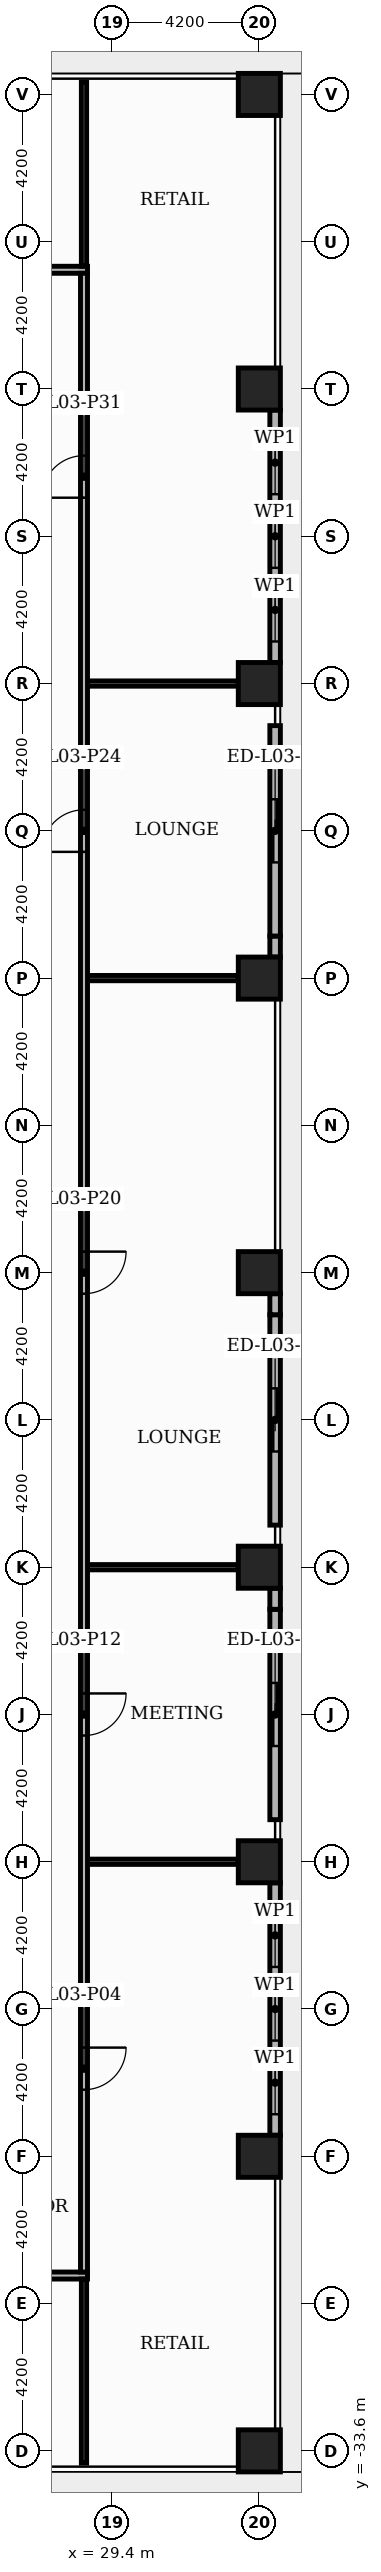
"""IFC4 building model, lengths in metres.
Left out: names, types, materials, properties, quantities, classifications, styles, units other than length and angle.
Written with IfcOpenShell. Run it as: python <this file> out.ifc"""

import sys

from ifc_helpers import new_model, si_unit, direction, frame, frame_2d, origin, origin_2d, place, context, subcontext, project, spatial, rectangle, extrude, element, fill, save


model = new_model("IFC4")
c1 = context("Model", 3, precision=1e-05, world=origin(), true_north=direction((0.0, 1.0)))
c2 = subcontext(c1, "Body", "Model", "MODEL_VIEW")
j1 = project(units=[si_unit("LENGTHUNIT", "METRE"), si_unit("PLANEANGLEUNIT", "RADIAN")], contexts=[c1])
p1 = place(None, origin())
s1 = spatial("IfcSite", under=j1, at=p1, CompositionType="ELEMENT")
p2 = place(p1, origin())
s2 = spatial("IfcBuilding", under=s1, at=p2, CompositionType="ELEMENT")
p3 = place(p2, frame((0.0, 0.0, 16.8)))
s3 = spatial("IfcBuildingStorey", under=s2, at=p3, CompositionType="ELEMENT", Elevation=16.8)
for number, where, z_axis, x_axis in (
    (1, (33.6, 0.0, 0.0), (0.0, 0.0, 1.0), (1.0, 0.0, 0.0)),
    (2, (33.6, 8.4, 0.0), (0.0, 0.0, 1.0), (1.0, 0.0, 0.0)),
    (3, (33.6, 16.8, 0.0), (0.0, 0.0, 1.0), (1.0, 0.0, 0.0)),
    (4, (33.6, 25.2, 0.0), (0.0, 0.0, 1.0), (1.0, 0.0, 0.0)),
    (5, (33.6, 33.6, 0.0), (0.0, 0.0, 1.0), (1.0, 0.0, 0.0)),
    (6, (33.6, -8.4, 0.0), (0.0, 0.0, 1.0), (1.0, 0.0, 0.0)),
    (7, (33.6, -16.8, 0.0), (0.0, 0.0, 1.0), (1.0, 0.0, 0.0)),
    (8, (33.6, -25.2, 0.0), (0.0, 0.0, 1.0), (1.0, 0.0, 0.0)),
    (9, (33.6, -33.6, 0.0), (0.0, 0.0, 1.0), (1.0, 0.0, 0.0)),
):
    element("IfcColumn", number, at=place(p3, frame(where, z_axis=z_axis, x_axis=x_axis)), inside=s3, PredefinedType="COLUMN", context=c2, shape_type="SweptSolid", body=[
        extrude(rectangle(XDim=1.2, YDim=1.2, at=origin_2d()), origin(), (0.0, 0.0, 1.0), 5.4),
    ])
p4 = place(p3, frame((34.05, -24.6, 0.0), z_axis=(0.0, 0.0, 1.0), x_axis=(0.0, 1.0, 0.0)))
e10 = element("IfcWall", 10, at=p4, inside=s3, PredefinedType="STANDARD", context=c2, shape_type="SweptSolid", body=[
    extrude(rectangle(XDim=7.2, YDim=0.3, at=frame_2d((3.6, 0.0))), origin(), (0.0, 0.0, 1.0), 4.98),
])
p5 = place(p4, frame((0.6, 0.0, 0.6)))
e11 = element("IfcOpeningElement", 11, at=p5, cuts=e10, PredefinedType="OPENING", context=c2, shape_type="SweptSolid", body=[
    extrude(rectangle(XDim=1.8, YDim=3.0, at=frame_2d((0.9, 1.5))), frame((0.0, 0.16, 0.0), z_axis=(0.0, -1.0, 0.0), x_axis=(1.0, 0.0, 0.0)), (0.0, 0.0, 1.0), 0.32),
])
p6 = place(p4, frame((2.7, 0.0, 0.6)))
e12 = element("IfcOpeningElement", 12, at=p6, cuts=e10, PredefinedType="OPENING", context=c2, shape_type="SweptSolid", body=[
    extrude(rectangle(XDim=1.8, YDim=3.0, at=frame_2d((0.9, 1.5))), frame((0.0, 0.16, 0.0), z_axis=(0.0, -1.0, 0.0), x_axis=(1.0, 0.0, 0.0)), (0.0, 0.0, 1.0), 0.32),
])
p7 = place(p4, frame((4.8, 0.0, 0.6)))
e13 = element("IfcOpeningElement", 13, at=p7, cuts=e10, PredefinedType="OPENING", context=c2, shape_type="SweptSolid", body=[
    extrude(rectangle(XDim=1.8, YDim=3.0, at=frame_2d((0.9, 1.5))), frame((0.0, 0.16, 0.0), z_axis=(0.0, -1.0, 0.0), x_axis=(1.0, 0.0, 0.0)), (0.0, 0.0, 1.0), 0.32),
])
p8 = place(p3, frame((34.05, -15.6, 0.0), z_axis=(0.0, 0.0, 1.0), x_axis=(0.0, 1.0, 0.0)))
e14 = element("IfcWall", 14, at=p8, inside=s3, PredefinedType="STANDARD", context=c2, shape_type="SweptSolid", body=[
    extrude(rectangle(XDim=6.0, YDim=0.3, at=frame_2d((3.0, 0.0))), origin(), (0.0, 0.0, 1.0), 4.98),
])
p9 = place(p8, frame((2.1, 0.0, 0.0)))
e15 = element("IfcOpeningElement", 15, at=p9, cuts=e14, PredefinedType="OPENING", context=c2, shape_type="SweptSolid", body=[
    extrude(rectangle(XDim=1.8, YDim=2.4, at=frame_2d((0.9, 1.2))), frame((0.0, 0.16, 0.0), z_axis=(0.0, -1.0, 0.0), x_axis=(1.0, 0.0, 0.0)), (0.0, 0.0, 1.0), 0.32),
])
p10 = place(p3, frame((34.05, -9.6, 0.0), z_axis=(0.0, 0.0, 1.0), x_axis=(0.0, 1.0, 0.0)))
e16 = element("IfcWall", 16, at=p10, inside=s3, PredefinedType="STANDARD", context=c2, shape_type="SweptSolid", body=[
    extrude(rectangle(XDim=0.6, YDim=0.3, at=frame_2d((0.3, 0.0))), origin(), (0.0, 0.0, 1.0), 4.98),
])
p11 = place(p3, frame((34.05, -7.2, 0.0), z_axis=(0.0, 0.0, 1.0), x_axis=(0.0, 1.0, 0.0)))
e17 = element("IfcWall", 17, at=p11, inside=s3, PredefinedType="STANDARD", context=c2, shape_type="SweptSolid", body=[
    extrude(rectangle(XDim=6.0, YDim=0.3, at=frame_2d((3.0, 0.0))), origin(), (0.0, 0.0, 1.0), 4.98),
])
p12 = place(p11, frame((2.1, 0.0, 0.0)))
e18 = element("IfcOpeningElement", 18, at=p12, cuts=e17, PredefinedType="OPENING", context=c2, shape_type="SweptSolid", body=[
    extrude(rectangle(XDim=1.8, YDim=2.4, at=frame_2d((0.9, 1.2))), frame((0.0, 0.16, 0.0), z_axis=(0.0, -1.0, 0.0), x_axis=(1.0, 0.0, 0.0)), (0.0, 0.0, 1.0), 0.32),
])
p13 = place(p3, frame((34.05, -1.2, 0.0), z_axis=(0.0, 0.0, 1.0), x_axis=(0.0, 1.0, 0.0)))
e19 = element("IfcWall", 19, at=p13, inside=s3, PredefinedType="STANDARD", context=c2, shape_type="SweptSolid", body=[
    extrude(rectangle(XDim=0.6, YDim=0.3, at=frame_2d((0.3, 0.0))), origin(), (0.0, 0.0, 1.0), 4.98),
])
p14 = place(p3, frame((34.05, 9.0, 0.0), z_axis=(0.0, 0.0, 1.0), x_axis=(0.0, 1.0, 0.0)))
e20 = element("IfcWall", 20, at=p14, inside=s3, PredefinedType="STANDARD", context=c2, shape_type="SweptSolid", body=[
    extrude(rectangle(XDim=0.6, YDim=0.3, at=frame_2d((0.3, 0.0))), origin(), (0.0, 0.0, 1.0), 4.98),
])
p15 = place(p3, frame((34.05, 9.6, 0.0), z_axis=(0.0, 0.0, 1.0), x_axis=(0.0, 1.0, 0.0)))
e21 = element("IfcWall", 21, at=p15, inside=s3, PredefinedType="STANDARD", context=c2, shape_type="SweptSolid", body=[
    extrude(rectangle(XDim=6.0, YDim=0.3, at=frame_2d((3.0, 0.0))), origin(), (0.0, 0.0, 1.0), 4.98),
])
p16 = place(p15, frame((2.1, 0.0, 0.0)))
e22 = element("IfcOpeningElement", 22, at=p16, cuts=e21, PredefinedType="OPENING", context=c2, shape_type="SweptSolid", body=[
    extrude(rectangle(XDim=1.8, YDim=2.4, at=frame_2d((0.9, 1.2))), frame((0.0, 0.16, 0.0), z_axis=(0.0, -1.0, 0.0), x_axis=(1.0, 0.0, 0.0)), (0.0, 0.0, 1.0), 0.32),
])
p17 = place(p3, frame((34.05, 17.4, 0.0), z_axis=(0.0, 0.0, 1.0), x_axis=(0.0, 1.0, 0.0)))
e23 = element("IfcWall", 23, at=p17, inside=s3, PredefinedType="STANDARD", context=c2, shape_type="SweptSolid", body=[
    extrude(rectangle(XDim=7.2, YDim=0.3, at=frame_2d((3.6, 0.0))), origin(), (0.0, 0.0, 1.0), 4.98),
])
p18 = place(p17, frame((0.6, 0.0, 0.6)))
e24 = element("IfcOpeningElement", 24, at=p18, cuts=e23, PredefinedType="OPENING", context=c2, shape_type="SweptSolid", body=[
    extrude(rectangle(XDim=1.8, YDim=3.0, at=frame_2d((0.9, 1.5))), frame((0.0, 0.16, 0.0), z_axis=(0.0, -1.0, 0.0), x_axis=(1.0, 0.0, 0.0)), (0.0, 0.0, 1.0), 0.32),
])
p19 = place(p17, frame((2.7, 0.0, 0.6)))
e25 = element("IfcOpeningElement", 25, at=p19, cuts=e23, PredefinedType="OPENING", context=c2, shape_type="SweptSolid", body=[
    extrude(rectangle(XDim=1.8, YDim=3.0, at=frame_2d((0.9, 1.5))), frame((0.0, 0.16, 0.0), z_axis=(0.0, -1.0, 0.0), x_axis=(1.0, 0.0, 0.0)), (0.0, 0.0, 1.0), 0.32),
])
p20 = place(p17, frame((4.8, 0.0, 0.6)))
e26 = element("IfcOpeningElement", 26, at=p20, cuts=e23, PredefinedType="OPENING", context=c2, shape_type="SweptSolid", body=[
    extrude(rectangle(XDim=1.8, YDim=3.0, at=frame_2d((0.9, 1.5))), frame((0.0, 0.16, 0.0), z_axis=(0.0, -1.0, 0.0), x_axis=(1.0, 0.0, 0.0)), (0.0, 0.0, 1.0), 0.32),
])
p21 = place(p3, frame((-28.7, -28.6, 0.0), z_axis=(0.0, 0.0, 1.0), x_axis=(1.0, 0.0, 0.0)))
e27 = element("IfcWall", 27, at=p21, inside=s3, PredefinedType="PARTITIONING", context=c2, shape_type="SweptSolid", body=[
    extrude(rectangle(XDim=57.4, YDim=0.2, at=frame_2d((28.7, 0.0))), origin(), (0.0, 0.0, 1.0), 4.68),
])
p22 = place(p21, frame((7.5, 0.0, 0.0)))
e28 = element("IfcOpeningElement", 28, at=p22, cuts=e27, PredefinedType="OPENING", context=c2, shape_type="SweptSolid", body=[
    extrude(rectangle(XDim=1.2, YDim=2.2, at=frame_2d((0.6, 1.1))), frame((0.0, 0.11, 0.0), z_axis=(0.0, -1.0, 0.0), x_axis=(1.0, 0.0, 0.0)), (0.0, 0.0, 1.0), 0.22),
])
p23 = place(p21, frame((28.1, 0.0, 0.0)))
e29 = element("IfcOpeningElement", 29, at=p23, cuts=e27, PredefinedType="OPENING", context=c2, shape_type="SweptSolid", body=[
    extrude(rectangle(XDim=1.2, YDim=2.2, at=frame_2d((0.6, 1.1))), frame((0.0, 0.11, 0.0), z_axis=(0.0, -1.0, 0.0), x_axis=(1.0, 0.0, 0.0)), (0.0, 0.0, 1.0), 0.22),
])
p24 = place(p21, frame((48.7, 0.0, 0.0)))
e30 = element("IfcOpeningElement", 30, at=p24, cuts=e27, PredefinedType="OPENING", context=c2, shape_type="SweptSolid", body=[
    extrude(rectangle(XDim=1.2, YDim=2.2, at=frame_2d((0.6, 1.1))), frame((0.0, 0.11, 0.0), z_axis=(0.0, -1.0, 0.0), x_axis=(1.0, 0.0, 0.0)), (0.0, 0.0, 1.0), 0.22),
])
for number, where, z_axis, x_axis in (
    (31, (28.7, -16.8, 0.0), (0.0, 0.0, 1.0), (1.0, 0.0, 0.0)),
    (32, (28.7, -8.4, 0.0), (0.0, 0.0, 1.0), (1.0, 0.0, 0.0)),
    (33, (28.7, 8.4, 0.0), (0.0, 0.0, 1.0), (1.0, 0.0, 0.0)),
    (34, (28.7, 16.8, 0.0), (0.0, 0.0, 1.0), (1.0, 0.0, 0.0)),
):
    element("IfcWall", number, at=place(p3, frame(where, z_axis=z_axis, x_axis=x_axis)), inside=s3, PredefinedType="PARTITIONING", context=c2, shape_type="SweptSolid", body=[
        extrude(rectangle(XDim=4.3, YDim=0.15, at=frame_2d((2.15, 0.0))), origin(), (0.0, 0.0, 1.0), 4.78),
    ])
p25 = place(p3, frame((-28.7, 28.6, 0.0), z_axis=(0.0, 0.0, 1.0), x_axis=(1.0, 0.0, 0.0)))
e35 = element("IfcWall", 35, at=p25, inside=s3, PredefinedType="PARTITIONING", context=c2, shape_type="SweptSolid", body=[
    extrude(rectangle(XDim=57.4, YDim=0.2, at=frame_2d((28.7, 0.0))), origin(), (0.0, 0.0, 1.0), 4.68),
])
p26 = place(p25, frame((13.8, 0.0, 0.0)))
e36 = element("IfcOpeningElement", 36, at=p26, cuts=e35, PredefinedType="OPENING", context=c2, shape_type="SweptSolid", body=[
    extrude(rectangle(XDim=1.2, YDim=2.2, at=frame_2d((0.6, 1.1))), frame((0.0, 0.11, 0.0), z_axis=(0.0, -1.0, 0.0), x_axis=(1.0, 0.0, 0.0)), (0.0, 0.0, 1.0), 0.22),
])
p27 = place(p25, frame((42.4, 0.0, 0.0)))
e37 = element("IfcOpeningElement", 37, at=p27, cuts=e35, PredefinedType="OPENING", context=c2, shape_type="SweptSolid", body=[
    extrude(rectangle(XDim=1.2, YDim=2.2, at=frame_2d((0.6, 1.1))), frame((0.0, 0.11, 0.0), z_axis=(0.0, -1.0, 0.0), x_axis=(1.0, 0.0, 0.0)), (0.0, 0.0, 1.0), 0.22),
])
p28 = place(p3, frame((28.6, -33.95, 0.0), z_axis=(0.0, 0.0, 1.0), x_axis=(0.0, 1.0, 0.0)))
e38 = element("IfcWall", 38, at=p28, inside=s3, PredefinedType="PARTITIONING", context=c2, shape_type="SweptSolid", body=[
    extrude(rectangle(XDim=5.25, YDim=0.15, at=frame_2d((2.625, 0.0))), origin(), (0.0, 0.0, 1.0), 4.78),
])
p29 = place(p3, frame((28.6, -28.5, 0.0), z_axis=(0.0, 0.0, 1.0), x_axis=(0.0, 1.0, 0.0)))
e39 = element("IfcWall", 39, at=p29, inside=s3, PredefinedType="PARTITIONING", context=c2, shape_type="SweptSolid", body=[
    extrude(rectangle(XDim=57.0, YDim=0.2, at=frame_2d((28.5, 0.0))), origin(), (0.0, 0.0, 1.0), 4.78),
])
p30 = place(p29, frame((5.2, 0.0, 0.0)))
e40 = element("IfcOpeningElement", 40, at=p30, cuts=e39, PredefinedType="OPENING", context=c2, shape_type="SweptSolid", body=[
    extrude(rectangle(XDim=1.2, YDim=2.2, at=frame_2d((0.6, 1.1))), frame((0.0, 0.11, 0.0), z_axis=(0.0, -1.0, 0.0), x_axis=(1.0, 0.0, 0.0)), (0.0, 0.0, 1.0), 0.22),
])
p31 = place(p29, frame((15.3, 0.0, 0.0)))
e41 = element("IfcOpeningElement", 41, at=p31, cuts=e39, PredefinedType="OPENING", context=c2, shape_type="SweptSolid", body=[
    extrude(rectangle(XDim=1.2, YDim=2.2, at=frame_2d((0.6, 1.1))), frame((0.0, 0.11, 0.0), z_axis=(0.0, -1.0, 0.0), x_axis=(1.0, 0.0, 0.0)), (0.0, 0.0, 1.0), 0.22),
])
p32 = place(p29, frame((27.9, 0.0, 0.0)))
e42 = element("IfcOpeningElement", 42, at=p32, cuts=e39, PredefinedType="OPENING", context=c2, shape_type="SweptSolid", body=[
    extrude(rectangle(XDim=1.2, YDim=2.2, at=frame_2d((0.6, 1.1))), frame((0.0, 0.11, 0.0), z_axis=(0.0, -1.0, 0.0), x_axis=(1.0, 0.0, 0.0)), (0.0, 0.0, 1.0), 0.22),
])
p33 = place(p29, frame((40.5, 0.0, 0.0)))
e43 = element("IfcOpeningElement", 43, at=p33, cuts=e39, PredefinedType="OPENING", context=c2, shape_type="SweptSolid", body=[
    extrude(rectangle(XDim=1.2, YDim=2.2, at=frame_2d((0.6, 1.1))), frame((0.0, 0.11, 0.0), z_axis=(0.0, -1.0, 0.0), x_axis=(1.0, 0.0, 0.0)), (0.0, 0.0, 1.0), 0.22),
])
p34 = place(p29, frame((50.6, 0.0, 0.0)))
e44 = element("IfcOpeningElement", 44, at=p34, cuts=e39, PredefinedType="OPENING", context=c2, shape_type="SweptSolid", body=[
    extrude(rectangle(XDim=1.2, YDim=2.2, at=frame_2d((0.6, 1.1))), frame((0.0, 0.11, 0.0), z_axis=(0.0, -1.0, 0.0), x_axis=(1.0, 0.0, 0.0)), (0.0, 0.0, 1.0), 0.22),
])
p35 = place(p3, frame((28.6, 28.7, 0.0), z_axis=(0.0, 0.0, 1.0), x_axis=(0.0, 1.0, 0.0)))
e45 = element("IfcWall", 45, at=p35, inside=s3, PredefinedType="PARTITIONING", context=c2, shape_type="SweptSolid", body=[
    extrude(rectangle(XDim=5.25, YDim=0.15, at=frame_2d((2.625, 0.0))), origin(), (0.0, 0.0, 1.0), 4.78),
])
p36 = place(p5, origin())
e46 = element("IfcWindow", 46, at=p36, inside=s3, PartitioningType="SINGLE_PANEL", PredefinedType="WINDOW", context=c2, shape_type="SweptSolid", body=[
    extrude(rectangle(XDim=1.8, YDim=3.0, at=frame_2d((0.9, 1.5))), frame((0.0, 0.03, 0.0), z_axis=(0.0, -1.0, 0.0), x_axis=(1.0, 0.0, 0.0)), (0.0, 0.0, 1.0), 0.06),
])
fill(e11, e46)
p37 = place(p6, origin())
e47 = element("IfcWindow", 47, at=p37, inside=s3, PartitioningType="SINGLE_PANEL", PredefinedType="WINDOW", context=c2, shape_type="SweptSolid", body=[
    extrude(rectangle(XDim=1.8, YDim=3.0, at=frame_2d((0.9, 1.5))), frame((0.0, 0.03, 0.0), z_axis=(0.0, -1.0, 0.0), x_axis=(1.0, 0.0, 0.0)), (0.0, 0.0, 1.0), 0.06),
])
fill(e12, e47)
p38 = place(p7, origin())
e48 = element("IfcWindow", 48, at=p38, inside=s3, PartitioningType="SINGLE_PANEL", PredefinedType="WINDOW", context=c2, shape_type="SweptSolid", body=[
    extrude(rectangle(XDim=1.8, YDim=3.0, at=frame_2d((0.9, 1.5))), frame((0.0, 0.03, 0.0), z_axis=(0.0, -1.0, 0.0), x_axis=(1.0, 0.0, 0.0)), (0.0, 0.0, 1.0), 0.06),
])
fill(e13, e48)
p39 = place(p9, origin())
e49 = element("IfcDoor", 49, at=p39, inside=s3, OperationType="SLIDING_TO_RIGHT", PredefinedType="DOOR", context=c2, shape_type="SweptSolid", body=[
    extrude(rectangle(XDim=1.8, YDim=2.4, at=frame_2d((0.9, 1.2))), frame((0.0, 0.025, 0.0), z_axis=(0.0, -1.0, 0.0), x_axis=(1.0, 0.0, 0.0)), (0.0, 0.0, 1.0), 0.05),
])
fill(e15, e49)
p40 = place(p12, origin())
e50 = element("IfcDoor", 50, at=p40, inside=s3, OperationType="SLIDING_TO_LEFT", PredefinedType="DOOR", context=c2, shape_type="SweptSolid", body=[
    extrude(rectangle(XDim=1.8, YDim=2.4, at=frame_2d((0.9, 1.2))), frame((0.0, 0.025, 0.0), z_axis=(0.0, -1.0, 0.0), x_axis=(1.0, 0.0, 0.0)), (0.0, 0.0, 1.0), 0.05),
])
fill(e18, e50)
p41 = place(p16, origin())
e51 = element("IfcDoor", 51, at=p41, inside=s3, OperationType="SLIDING_TO_RIGHT", PredefinedType="DOOR", context=c2, shape_type="SweptSolid", body=[
    extrude(rectangle(XDim=1.8, YDim=2.4, at=frame_2d((0.9, 1.2))), frame((0.0, 0.025, 0.0), z_axis=(0.0, -1.0, 0.0), x_axis=(1.0, 0.0, 0.0)), (0.0, 0.0, 1.0), 0.05),
])
fill(e22, e51)
p42 = place(p18, origin())
e52 = element("IfcWindow", 52, at=p42, inside=s3, PartitioningType="SINGLE_PANEL", PredefinedType="WINDOW", context=c2, shape_type="SweptSolid", body=[
    extrude(rectangle(XDim=1.8, YDim=3.0, at=frame_2d((0.9, 1.5))), frame((0.0, 0.03, 0.0), z_axis=(0.0, -1.0, 0.0), x_axis=(1.0, 0.0, 0.0)), (0.0, 0.0, 1.0), 0.06),
])
fill(e24, e52)
p43 = place(p19, origin())
e53 = element("IfcWindow", 53, at=p43, inside=s3, PartitioningType="SINGLE_PANEL", PredefinedType="WINDOW", context=c2, shape_type="SweptSolid", body=[
    extrude(rectangle(XDim=1.8, YDim=3.0, at=frame_2d((0.9, 1.5))), frame((0.0, 0.03, 0.0), z_axis=(0.0, -1.0, 0.0), x_axis=(1.0, 0.0, 0.0)), (0.0, 0.0, 1.0), 0.06),
])
fill(e25, e53)
p44 = place(p20, origin())
e54 = element("IfcWindow", 54, at=p44, inside=s3, PartitioningType="SINGLE_PANEL", PredefinedType="WINDOW", context=c2, shape_type="SweptSolid", body=[
    extrude(rectangle(XDim=1.8, YDim=3.0, at=frame_2d((0.9, 1.5))), frame((0.0, 0.03, 0.0), z_axis=(0.0, -1.0, 0.0), x_axis=(1.0, 0.0, 0.0)), (0.0, 0.0, 1.0), 0.06),
])
fill(e26, e54)
p45 = place(p30, origin())
e55 = element("IfcDoor", 55, at=p45, inside=s3, OperationType="SINGLE_SWING_RIGHT", PredefinedType="DOOR", context=c2, shape_type="SweptSolid", body=[
    extrude(rectangle(XDim=1.2, YDim=2.2, at=frame_2d((0.6, 1.1))), frame((0.0, 0.025, 0.0), z_axis=(0.0, -1.0, 0.0), x_axis=(1.0, 0.0, 0.0)), (0.0, 0.0, 1.0), 0.05),
])
fill(e40, e55)
p46 = place(p31, origin())
e56 = element("IfcDoor", 56, at=p46, inside=s3, OperationType="SINGLE_SWING_RIGHT", PredefinedType="DOOR", context=c2, shape_type="SweptSolid", body=[
    extrude(rectangle(XDim=1.2, YDim=2.2, at=frame_2d((0.6, 1.1))), frame((0.0, 0.025, 0.0), z_axis=(0.0, -1.0, 0.0), x_axis=(1.0, 0.0, 0.0)), (0.0, 0.0, 1.0), 0.05),
])
fill(e41, e56)
p47 = place(p32, origin())
e57 = element("IfcDoor", 57, at=p47, inside=s3, OperationType="SINGLE_SWING_RIGHT", PredefinedType="DOOR", context=c2, shape_type="SweptSolid", body=[
    extrude(rectangle(XDim=1.2, YDim=2.2, at=frame_2d((0.6, 1.1))), frame((0.0, 0.025, 0.0), z_axis=(0.0, -1.0, 0.0), x_axis=(1.0, 0.0, 0.0)), (0.0, 0.0, 1.0), 0.05),
])
fill(e42, e57)
p48 = place(p33, origin())
e58 = element("IfcDoor", 58, at=p48, inside=s3, OperationType="SINGLE_SWING_LEFT", PredefinedType="DOOR", context=c2, shape_type="SweptSolid", body=[
    extrude(rectangle(XDim=1.2, YDim=2.2, at=frame_2d((0.6, 1.1))), frame((0.0, 0.025, 0.0), z_axis=(0.0, -1.0, 0.0), x_axis=(1.0, 0.0, 0.0)), (0.0, 0.0, 1.0), 0.05),
])
fill(e43, e58)
p49 = place(p34, origin())
e59 = element("IfcDoor", 59, at=p49, inside=s3, OperationType="SINGLE_SWING_LEFT", PredefinedType="DOOR", context=c2, shape_type="SweptSolid", body=[
    extrude(rectangle(XDim=1.2, YDim=2.2, at=frame_2d((0.6, 1.1))), frame((0.0, 0.025, 0.0), z_axis=(0.0, -1.0, 0.0), x_axis=(1.0, 0.0, 0.0)), (0.0, 0.0, 1.0), 0.05),
])
fill(e44, e59)
save(model, sys.argv[1])
